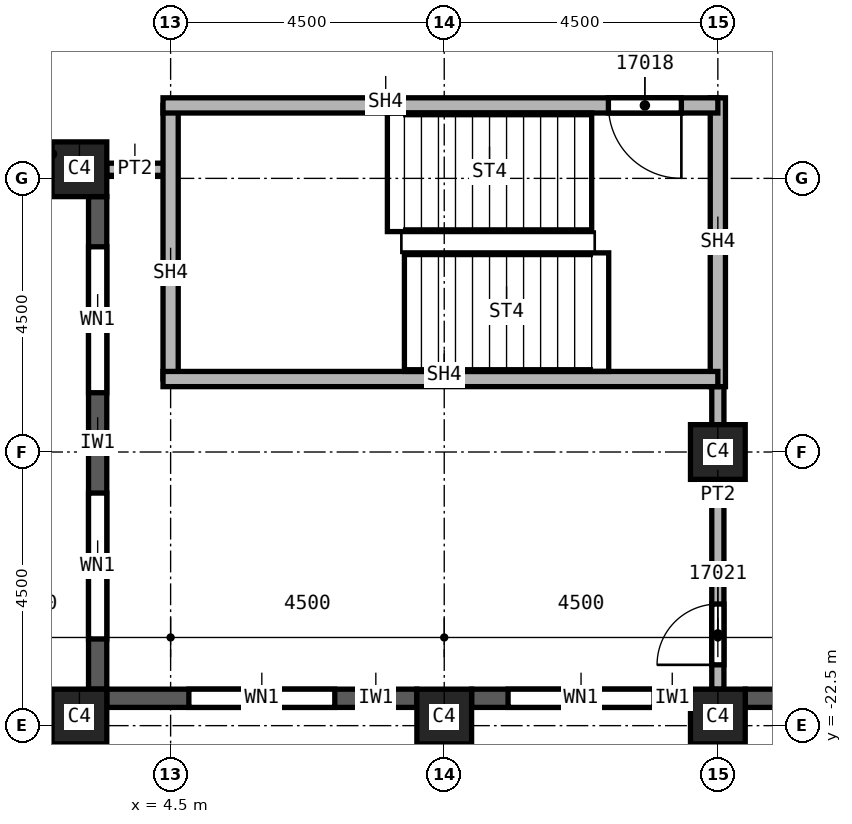
"""IFC4 building model, lengths in metres.
Left out: names, types, materials, properties, quantities, classifications, styles, units other than length and angle.
Written with IfcOpenShell. Run it as: python <this file> out.ifc"""

import sys

from ifc_helpers import new_model, si_unit, direction, frame, frame_2d, origin, origin_2d, place, context, subcontext, project, spatial, rectangle, extrude, element, fill, save


model = new_model("IFC4")
c1 = context("Model", 3, precision=1e-05, world=origin(), true_north=direction((0.0, 1.0)))
c2 = subcontext(c1, "Body", "Model", "MODEL_VIEW")
j1 = project(units=[si_unit("LENGTHUNIT", "METRE"), si_unit("PLANEANGLEUNIT", "RADIAN")], contexts=[c1])
p1 = place(None, origin())
s1 = spatial("IfcSite", under=j1, at=p1, CompositionType="ELEMENT")
p2 = place(p1, origin())
s2 = spatial("IfcBuilding", under=s1, at=p2, CompositionType="ELEMENT")
p3 = place(p2, frame((0.0, 0.0, 254.0)))
s3 = spatial("IfcBuildingStorey", under=s2, at=p3, CompositionType="ELEMENT", Elevation=254.0)
for number, where, z_axis, x_axis in (
    (1, (13.5, -18.0, 0.0), (0.0, 0.0, 1.0), (1.0, 0.0, 0.0)),
    (2, (3.0, -22.35, 0.0), (0.0, 0.0, 1.0), (1.0, 0.0, 0.0)),
    (3, (9.0, -22.35, 0.0), (0.0, 0.0, 1.0), (1.0, 0.0, 0.0)),
    (4, (13.5, -22.35, 0.0), (0.0, 0.0, 1.0), (1.0, 0.0, 0.0)),
    (5, (3.0, -13.35, 0.0), (0.0, 0.0, 1.0), (1.0, 0.0, 0.0)),
):
    element("IfcColumn", number, at=place(p3, frame(where, z_axis=z_axis, x_axis=x_axis)), inside=s3, PredefinedType="COLUMN", context=c2, shape_type="SweptSolid", body=[
        extrude(rectangle(XDim=0.9, YDim=0.9, at=origin_2d()), origin(), (0.0, 0.0, 1.0), 3.72),
    ])
p4 = place(p3, frame((3.3, -13.8, 0.0), z_axis=(0.0, 0.0, 1.0), x_axis=(0.0, -1.0, 0.0)))
e6 = element("IfcWall", 6, at=p4, inside=s3, PredefinedType="SOLIDWALL", context=c2, shape_type="SweptSolid", body=[
    extrude(rectangle(XDim=8.1, YDim=0.3, at=frame_2d((4.05, 0.0))), origin(), (0.0, 0.0, 1.0), 3.12),
])
p5 = place(p4, frame((0.825, 0.0, 0.8)))
e7 = element("IfcOpeningElement", 7, at=p5, cuts=e6, PredefinedType="OPENING", context=c2, shape_type="SweptSolid", body=[
    extrude(rectangle(XDim=2.4, YDim=1.95, at=frame_2d((1.2, 0.975))), frame((0.0, 0.15, 0.0), z_axis=(0.0, -1.0, 0.0), x_axis=(1.0, 0.0, 0.0)), (0.0, 0.0, 1.0), 0.3),
])
p6 = place(p4, frame((4.875, 0.0, 0.8)))
e8 = element("IfcOpeningElement", 8, at=p6, cuts=e6, PredefinedType="OPENING", context=c2, shape_type="SweptSolid", body=[
    extrude(rectangle(XDim=2.4, YDim=1.95, at=frame_2d((1.2, 0.975))), frame((0.0, 0.15, 0.0), z_axis=(0.0, -1.0, 0.0), x_axis=(1.0, 0.0, 0.0)), (0.0, 0.0, 1.0), 0.3),
])
p7 = place(p3, frame((3.45, -22.05, 0.0), z_axis=(0.0, 0.0, 1.0), x_axis=(1.0, 0.0, 0.0)))
e9 = element("IfcWall", 9, at=p7, inside=s3, PredefinedType="SOLIDWALL", context=c2, shape_type="SweptSolid", body=[
    extrude(rectangle(XDim=5.1, YDim=0.3, at=frame_2d((2.55, 0.0))), origin(), (0.0, 0.0, 1.0), 3.12),
])
p8 = place(p7, frame((1.35, 0.0, 0.8)))
e10 = element("IfcOpeningElement", 10, at=p8, cuts=e9, PredefinedType="OPENING", context=c2, shape_type="SweptSolid", body=[
    extrude(rectangle(XDim=2.4, YDim=1.95, at=frame_2d((1.2, 0.975))), frame((0.0, 0.15, 0.0), z_axis=(0.0, -1.0, 0.0), x_axis=(1.0, 0.0, 0.0)), (0.0, 0.0, 1.0), 0.3),
])
p9 = place(p3, frame((9.45, -22.05, 0.0), z_axis=(0.0, 0.0, 1.0), x_axis=(1.0, 0.0, 0.0)))
e11 = element("IfcWall", 11, at=p9, inside=s3, PredefinedType="SOLIDWALL", context=c2, shape_type="SweptSolid", body=[
    extrude(rectangle(XDim=3.6, YDim=0.3, at=frame_2d((1.8, 0.0))), origin(), (0.0, 0.0, 1.0), 3.12),
])
p10 = place(p9, frame((0.6, 0.0, 0.8)))
e12 = element("IfcOpeningElement", 12, at=p10, cuts=e11, PredefinedType="OPENING", context=c2, shape_type="SweptSolid", body=[
    extrude(rectangle(XDim=2.4, YDim=1.95, at=frame_2d((1.2, 0.975))), frame((0.0, 0.15, 0.0), z_axis=(0.0, -1.0, 0.0), x_axis=(1.0, 0.0, 0.0)), (0.0, 0.0, 1.0), 0.3),
])
p11 = place(p3, frame((13.95, -22.05, 0.0), z_axis=(0.0, 0.0, 1.0), x_axis=(1.0, 0.0, 0.0)))
e13 = element("IfcWall", 13, at=p11, inside=s3, PredefinedType="SOLIDWALL", context=c2, shape_type="SweptSolid", body=[
    extrude(rectangle(XDim=3.6, YDim=0.3, at=frame_2d((1.8, 0.0))), origin(), (0.0, 0.0, 1.0), 3.12),
])
p12 = place(p11, frame((0.625, 0.0, 0.8)))
e14 = element("IfcOpeningElement", 14, at=p12, cuts=e13, PredefinedType="OPENING", context=c2, shape_type="SweptSolid", body=[
    extrude(rectangle(XDim=0.6, YDim=1.95, at=frame_2d((0.3, 0.975))), frame((0.0, 0.15, 0.0), z_axis=(0.0, -1.0, 0.0), x_axis=(1.0, 0.0, 0.0)), (0.0, 0.0, 1.0), 0.3),
])
p13 = place(p11, frame((1.825, 0.0, 0.8)))
e15 = element("IfcOpeningElement", 15, at=p13, cuts=e13, PredefinedType="OPENING", context=c2, shape_type="SweptSolid", body=[
    extrude(rectangle(XDim=1.0, YDim=1.95, at=frame_2d((0.5, 0.975))), frame((0.0, 0.15, 0.0), z_axis=(0.0, -1.0, 0.0), x_axis=(1.0, 0.0, 0.0)), (0.0, 0.0, 1.0), 0.3),
])
p14 = place(p3, frame((4.5, -13.35, 0.0), z_axis=(0.0, 0.0, 1.0), x_axis=(-1.0, 0.0, 0.0)))
e16 = element("IfcWall", 16, at=p14, inside=s3, PredefinedType="PARTITIONING", context=c2, shape_type="SweptSolid", body=[
    extrude(rectangle(XDim=1.05, YDim=0.2, at=frame_2d((0.525, 0.0))), origin(), (0.0, 0.0, 1.0), 3.72),
])
p15 = place(p3, frame((13.5, -21.9, 0.0), z_axis=(0.0, 0.0, 1.0), x_axis=(0.0, 1.0, 0.0)))
e17 = element("IfcWall", 17, at=p15, inside=s3, PredefinedType="PARTITIONING", context=c2, shape_type="SweptSolid", body=[
    extrude(rectangle(XDim=5.225, YDim=0.2, at=frame_2d((2.612, 0.0))), origin(), (0.0, 0.0, 1.0), 3.72),
])
p16 = place(p15, frame((0.4, 0.0, 0.0)))
e18 = element("IfcOpeningElement", 18, at=p16, cuts=e17, PredefinedType="OPENING", context=c2, shape_type="SweptSolid", body=[
    extrude(rectangle(XDim=1.0, YDim=2.1, at=frame_2d((0.5, 1.05))), frame((0.0, 0.1, 0.0), z_axis=(0.0, -1.0, 0.0), x_axis=(1.0, 0.0, 0.0)), (0.0, 0.0, 1.0), 0.2),
])
p17 = place(p3, frame((4.5, -16.8, 0.0), z_axis=(0.0, 0.0, 1.0), x_axis=(0.0, 1.0, 0.0)))
e19 = element("IfcWall", 19, at=p17, inside=s3, PredefinedType="SOLIDWALL", context=c2, shape_type="SweptSolid", body=[
    extrude(rectangle(XDim=4.5, YDim=0.25, at=frame_2d((2.25, 0.0))), origin(), (0.0, 0.0, 1.0), 3.72),
])
p18 = place(p3, frame((13.5, -16.925, 0.0), z_axis=(0.0, 0.0, 1.0), x_axis=(0.0, 1.0, 0.0)))
e20 = element("IfcWall", 20, at=p18, inside=s3, PredefinedType="SOLIDWALL", context=c2, shape_type="SweptSolid", body=[
    extrude(rectangle(XDim=4.75, YDim=0.25, at=frame_2d((2.375, 0.0))), origin(), (0.0, 0.0, 1.0), 3.72),
])
p19 = place(p3, frame((13.5, -16.8, 0.0), z_axis=(0.0, 0.0, 1.0), x_axis=(-1.0, 0.0, 0.0)))
e21 = element("IfcWall", 21, at=p19, inside=s3, PredefinedType="SOLIDWALL", context=c2, shape_type="SweptSolid", body=[
    extrude(rectangle(XDim=9.125, YDim=0.25, at=frame_2d((4.562, 0.0))), origin(), (0.0, 0.0, 1.0), 3.72),
])
p20 = place(p3, frame((13.5, -12.3, 0.0), z_axis=(0.0, 0.0, 1.0), x_axis=(-1.0, 0.0, 0.0)))
e22 = element("IfcWall", 22, at=p20, inside=s3, PredefinedType="SOLIDWALL", context=c2, shape_type="SweptSolid", body=[
    extrude(rectangle(XDim=9.125, YDim=0.25, at=frame_2d((4.562, 0.0))), origin(), (0.0, 0.0, 1.0), 3.72),
])
p21 = place(p20, frame((0.6, 0.0, 0.0)))
e23 = element("IfcOpeningElement", 23, at=p21, cuts=e22, PredefinedType="OPENING", context=c2, shape_type="SweptSolid", body=[
    extrude(rectangle(XDim=1.2, YDim=2.1, at=frame_2d((0.6, 1.05))), frame((0.0, 0.125, 0.0), z_axis=(0.0, -1.0, 0.0), x_axis=(1.0, 0.0, 0.0)), (0.0, 0.0, 1.0), 0.25),
])
p22 = place(p5, origin())
e24 = element("IfcWindow", 24, at=p22, inside=s3, PartitioningType="SINGLE_PANEL", PredefinedType="WINDOW", context=c2, shape_type="SweptSolid", body=[
    extrude(rectangle(XDim=2.4, YDim=1.95, at=frame_2d((1.2, 0.975))), frame((0.0, 0.03, 0.0), z_axis=(0.0, -1.0, 0.0), x_axis=(1.0, 0.0, 0.0)), (0.0, 0.0, 1.0), 0.06),
])
fill(e7, e24)
p23 = place(p6, origin())
e25 = element("IfcWindow", 25, at=p23, inside=s3, PartitioningType="SINGLE_PANEL", PredefinedType="WINDOW", context=c2, shape_type="SweptSolid", body=[
    extrude(rectangle(XDim=2.4, YDim=1.95, at=frame_2d((1.2, 0.975))), frame((0.0, 0.03, 0.0), z_axis=(0.0, -1.0, 0.0), x_axis=(1.0, 0.0, 0.0)), (0.0, 0.0, 1.0), 0.06),
])
fill(e8, e25)
p24 = place(p8, origin())
e26 = element("IfcWindow", 26, at=p24, inside=s3, PartitioningType="SINGLE_PANEL", PredefinedType="WINDOW", context=c2, shape_type="SweptSolid", body=[
    extrude(rectangle(XDim=2.4, YDim=1.95, at=frame_2d((1.2, 0.975))), frame((0.0, 0.03, 0.0), z_axis=(0.0, -1.0, 0.0), x_axis=(1.0, 0.0, 0.0)), (0.0, 0.0, 1.0), 0.06),
])
fill(e10, e26)
p25 = place(p10, origin())
e27 = element("IfcWindow", 27, at=p25, inside=s3, PartitioningType="SINGLE_PANEL", PredefinedType="WINDOW", context=c2, shape_type="SweptSolid", body=[
    extrude(rectangle(XDim=2.4, YDim=1.95, at=frame_2d((1.2, 0.975))), frame((0.0, 0.03, 0.0), z_axis=(0.0, -1.0, 0.0), x_axis=(1.0, 0.0, 0.0)), (0.0, 0.0, 1.0), 0.06),
])
fill(e12, e27)
p26 = place(p21, origin())
e28 = element("IfcDoor", 28, at=p26, inside=s3, OperationType="SINGLE_SWING_LEFT", PredefinedType="DOOR", context=c2, shape_type="SweptSolid", body=[
    extrude(rectangle(XDim=1.2, YDim=2.1, at=frame_2d((0.6, 1.05))), frame((0.0, 0.025, 0.0), z_axis=(0.0, -1.0, 0.0), x_axis=(1.0, 0.0, 0.0)), (0.0, 0.0, 1.0), 0.05),
])
fill(e23, e28)
p27 = place(p16, origin())
e29 = element("IfcDoor", 29, at=p27, inside=s3, OperationType="SINGLE_SWING_RIGHT", PredefinedType="DOOR", context=c2, shape_type="SweptSolid", body=[
    extrude(rectangle(XDim=1.0, YDim=2.1, at=frame_2d((0.5, 1.05))), frame((0.0, 0.025, 0.0), z_axis=(0.0, -1.0, 0.0), x_axis=(1.0, 0.0, 0.0)), (0.0, 0.0, 1.0), 0.05),
])
fill(e18, e29)
save(model, sys.argv[1])
